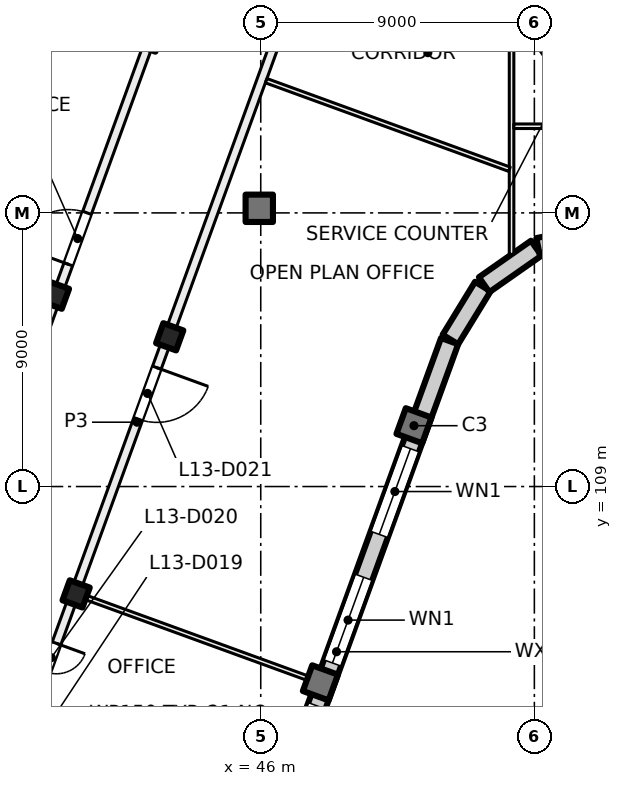
"""IFC4 building model, lengths in metres.
Left out: names, types, materials, properties, quantities, classifications, styles, units other than length and angle.
Written with IfcOpenShell. Run it as: python <this file> out.ifc"""

import sys

from ifc_helpers import new_model, si_unit, direction, frame, frame_2d, origin, origin_2d, place, context, subcontext, project, spatial, rectangle, hollow_rectangle, extrude, element, fill, save


model = new_model("IFC4")
c1 = context("Model", 3, precision=1e-05, world=origin(), true_north=direction((0.0, 1.0)))
c2 = subcontext(c1, "Body", "Model", "MODEL_VIEW")
j1 = project(units=[si_unit("LENGTHUNIT", "METRE"), si_unit("PLANEANGLEUNIT", "RADIAN")], contexts=[c1])
p1 = place(None, origin())
s1 = spatial("IfcSite", under=j1, at=p1, CompositionType="ELEMENT")
p2 = place(p1, origin())
s2 = spatial("IfcBuilding", under=s1, at=p2, CompositionType="ELEMENT")
p3 = place(p2, frame((0.0, 0.0, 59.5)))
s3 = spatial("IfcBuildingStorey", under=s2, at=p3, CompositionType="ELEMENT", Elevation=59.5)
p4 = place(p3, frame((56.036, 123.43, 0.0), z_axis=(0.0, 0.0, 1.0), x_axis=(0.573576436351, -0.819152044289, 0.0)))
e1 = element("IfcColumn", 1, at=p4, inside=s3, PredefinedType="COLUMN", context=c2, shape_type="SweptSolid", body=[
    extrude(hollow_rectangle(XDim=1.4, YDim=1.4, WallThickness=0.04, at=origin_2d()), origin(), (0.0, 0.0, 1.0), 4.0),
])
p5 = place(p3, frame((45.952, 118.152, 0.0), z_axis=(0.0, 0.0, 1.0), x_axis=(1.0, 0.0, 0.0)))
e2 = element("IfcColumn", 2, at=p5, inside=s3, PredefinedType="COLUMN", context=c2, shape_type="SweptSolid", body=[
    extrude(rectangle(XDim=0.9, YDim=0.9, at=origin_2d()), origin(), (0.0, 0.0, 1.0), 4.0),
])
for number, where, z_axis, x_axis in (
    (3, (43.006, 113.925, 0.0), (0.0, 0.0, 1.0), (-0.342, -0.94, 0.0)),
    (4, (39.927, 105.468, 0.0), (0.0, 0.0, 1.0), (-0.342, -0.94, 0.0)),
    (5, (39.247, 115.293, 0.0), (0.0, 0.0, 1.0), (-0.342, -0.94, 0.0)),
):
    element("IfcColumn", number, at=place(p3, frame(where, z_axis=z_axis, x_axis=x_axis)), inside=s3, PredefinedType="COLUMN", context=c2, shape_type="SweptSolid", body=[
        extrude(rectangle(XDim=0.7, YDim=0.7, at=origin_2d()), origin(), (0.0, 0.0, 1.0), 4.0),
    ])
for number, where, z_axis, x_axis in (
    (6, (51.04, 111.001, 0.0), (0.0, 0.0, 1.0), (-0.342, -0.94, 0.0)),
    (7, (47.962, 102.544, 0.0), (0.0, 0.0, 1.0), (-0.342, -0.94, 0.0)),
):
    element("IfcColumn", number, at=place(p3, frame(where, z_axis=z_axis, x_axis=x_axis)), inside=s3, PredefinedType="COLUMN", context=c2, shape_type="SweptSolid", body=[
        extrude(rectangle(XDim=0.9, YDim=0.9, at=origin_2d()), origin(), (0.0, 0.0, 1.0), 4.0),
    ])
p6 = place(p3, frame((52.212, 113.783, 0.0), z_axis=(0.0, 0.0, 1.0), x_axis=(-0.34202521188, -0.939690775968, 0.0)))
e8 = element("IfcWall", 8, at=p6, inside=s3, PredefinedType="SOLIDWALL", context=c2, shape_type="SweptSolid", body=[
    extrude(rectangle(XDim=21.745, YDim=0.6, at=frame_2d((10.873, 0.0))), origin(), (0.0, 0.0, 1.0), 3.625),
])
p7 = place(p6, frame((3.765, 0.0, 0.9)))
e9 = element("IfcOpeningElement", 9, at=p7, cuts=e8, PredefinedType="OPENING", context=c2, shape_type="SweptSolid", body=[
    extrude(rectangle(XDim=3.0, YDim=2.4, at=frame_2d((1.5, 1.2))), frame((0.0, 0.31, 0.0), z_axis=(0.0, -1.0, 0.0), x_axis=(1.0, 0.0, 0.0)), (0.0, 0.0, 1.0), 0.62),
])
p8 = place(p6, frame((8.265, 0.0, 0.9)))
e10 = element("IfcOpeningElement", 10, at=p8, cuts=e8, PredefinedType="OPENING", context=c2, shape_type="SweptSolid", body=[
    extrude(rectangle(XDim=3.0, YDim=2.4, at=frame_2d((1.5, 1.2))), frame((0.0, 0.31, 0.0), z_axis=(0.0, -1.0, 0.0), x_axis=(1.0, 0.0, 0.0)), (0.0, 0.0, 1.0), 0.62),
])
p9 = place(p6, frame((12.765, 0.0, 0.9)))
e11 = element("IfcOpeningElement", 11, at=p9, cuts=e8, PredefinedType="OPENING", context=c2, shape_type="SweptSolid", body=[
    extrude(rectangle(XDim=3.0, YDim=2.4, at=frame_2d((1.5, 1.2))), frame((0.0, 0.31, 0.0), z_axis=(0.0, -1.0, 0.0), x_axis=(1.0, 0.0, 0.0)), (0.0, 0.0, 1.0), 0.62),
])
p10 = place(p6, frame((17.265, 0.0, 0.9)))
e12 = element("IfcOpeningElement", 12, at=p10, cuts=e8, PredefinedType="OPENING", context=c2, shape_type="SweptSolid", body=[
    extrude(rectangle(XDim=3.0, YDim=2.4, at=frame_2d((1.5, 1.2))), frame((0.0, 0.31, 0.0), z_axis=(0.0, -1.0, 0.0), x_axis=(1.0, 0.0, 0.0)), (0.0, 0.0, 1.0), 0.62),
])
p11 = place(p3, frame((53.305, 115.578, 0.0), z_axis=(0.0, 0.0, 1.0), x_axis=(-0.522402266438, -0.852699168535, 0.0)))
e13 = element("IfcWall", 13, at=p11, inside=s3, PredefinedType="SOLIDWALL", context=c2, shape_type="SweptSolid", body=[
    extrude(rectangle(XDim=2.042, YDim=0.6, at=frame_2d((1.021, 0.0))), origin(), (0.0, 0.0, 1.0), 3.625),
])
for number, where, z_axis, x_axis in (
    (14, (55.062, 116.839, 0.0), (0.0, 0.0, 1.0), (-0.819, -0.574, 0.0)),
    (15, (57.175, 117.294, 0.0), (0.0, 0.0, 1.0), (-0.98, -0.199, 0.0)),
):
    element("IfcWall", number, at=place(p3, frame(where, z_axis=z_axis, x_axis=x_axis)), inside=s3, PredefinedType="SOLIDWALL", context=c2, shape_type="SweptSolid", body=[
        extrude(rectangle(XDim=2.092, YDim=0.6, at=frame_2d((1.046, 0.0))), origin(), (0.0, 0.0, 1.0), 3.625),
    ])
p12 = place(p3, frame((32.881, 97.657, 0.0), z_axis=(0.0, 0.0, 1.0), x_axis=(0.342017360004, 0.939693633828, 0.0)))
e16 = element("IfcWall", 16, at=p12, inside=s3, PredefinedType="PARTITIONING", context=c2, shape_type="SweptSolid", body=[
    extrude(rectangle(XDim=34.516, YDim=0.3, at=frame_2d((17.258, 0.0))), origin(), (0.0, 0.0, 1.0), 3.625),
])
p13 = place(p12, frame((6.0, 0.0, 0.0)))
e17 = element("IfcOpeningElement", 17, at=p13, cuts=e16, PredefinedType="OPENING", context=c2, shape_type="SweptSolid", body=[
    extrude(rectangle(XDim=1.0, YDim=2.1, at=frame_2d((0.5, 1.05))), frame((0.0, 0.16, 0.0), z_axis=(0.0, -1.0, 0.0), x_axis=(1.0, 0.0, 0.0)), (0.0, 0.0, 1.0), 0.32),
])
p14 = place(p12, frame((19.85, 0.0, 0.0)))
e18 = element("IfcOpeningElement", 18, at=p14, cuts=e16, PredefinedType="OPENING", context=c2, shape_type="SweptSolid", body=[
    extrude(rectangle(XDim=1.8, YDim=2.1, at=frame_2d((0.9, 1.05))), frame((0.0, 0.16, 0.0), z_axis=(0.0, -1.0, 0.0), x_axis=(1.0, 0.0, 0.0)), (0.0, 0.0, 1.0), 0.32),
])
p15 = place(p3, frame((40.021, 105.434, 0.0), z_axis=(0.0, 0.0, 1.0), x_axis=(0.939687752599, -0.342033518263, 0.0)))
e19 = element("IfcWall", 19, at=p15, inside=s3, PredefinedType="PARTITIONING", context=c2, shape_type="SweptSolid", body=[
    extrude(rectangle(XDim=8.301, YDim=0.15, at=frame_2d((4.15, 0.0))), origin(), (0.0, 0.0, 1.0), 3.625),
])
p16 = place(p3, frame((47.314, 125.909, 0.0), z_axis=(0.0, 0.0, 1.0), x_axis=(-0.342010770371, -0.939696032209, 0.0)))
e20 = element("IfcWall", 20, at=p16, inside=s3, PredefinedType="PARTITIONING", context=c2, shape_type="SweptSolid", body=[
    extrude(rectangle(XDim=31.485, YDim=0.3, at=frame_2d((15.742, 0.0))), origin(), (0.0, 0.0, 1.0), 3.625),
])
p17 = place(p16, frame((28.359, 0.0, 0.0)))
e21 = element("IfcOpeningElement", 21, at=p17, cuts=e20, PredefinedType="OPENING", context=c2, shape_type="SweptSolid", body=[
    extrude(rectangle(XDim=1.0, YDim=2.1, at=frame_2d((0.5, 1.05))), frame((0.0, 0.16, 0.0), z_axis=(0.0, -1.0, 0.0), x_axis=(1.0, 0.0, 0.0)), (0.0, 0.0, 1.0), 0.32),
])
p18 = place(p16, frame((23.484, 0.0, 0.0)))
e22 = element("IfcOpeningElement", 22, at=p18, cuts=e20, PredefinedType="OPENING", context=c2, shape_type="SweptSolid", body=[
    extrude(rectangle(XDim=1.0, YDim=2.1, at=frame_2d((0.5, 1.05))), frame((0.0, 0.16, 0.0), z_axis=(0.0, -1.0, 0.0), x_axis=(1.0, 0.0, 0.0)), (0.0, 0.0, 1.0), 0.32),
])
p19 = place(p16, frame((13.834, 0.0, 0.0)))
e23 = element("IfcOpeningElement", 23, at=p19, cuts=e20, PredefinedType="OPENING", context=c2, shape_type="SweptSolid", body=[
    extrude(rectangle(XDim=1.8, YDim=2.1, at=frame_2d((0.9, 1.05))), frame((0.0, 0.16, 0.0), z_axis=(0.0, -1.0, 0.0), x_axis=(1.0, 0.0, 0.0)), (0.0, 0.0, 1.0), 0.32),
])
p20 = place(p3, frame((54.25, 116.637, 0.0), z_axis=(0.0, 0.0, 1.0), x_axis=(0.0, 1.0, 0.0)))
e24 = element("IfcWall", 24, at=p20, inside=s3, PredefinedType="PARTITIONING", context=c2, shape_type="SweptSolid", body=[
    extrude(rectangle(XDim=9.263, YDim=0.15, at=frame_2d((4.631, 0.0))), origin(), (0.0, 0.0, 1.0), 3.625),
])
p21 = place(p3, frame((54.18, 119.436, 0.0), z_axis=(0.0, 0.0, 1.0), x_axis=(-0.939669476286, 0.342083725624, 0.0)))
e25 = element("IfcWall", 25, at=p21, inside=s3, PredefinedType="PARTITIONING", context=c2, shape_type="SweptSolid", body=[
    extrude(rectangle(XDim=8.516, YDim=0.15, at=frame_2d((4.258, 0.0))), origin(), (0.0, 0.0, 1.0), 3.625),
])
p22 = place(p3, frame((54.325, 120.85, 0.0), z_axis=(0.0, 0.0, 1.0), x_axis=(1.0, 0.0, 0.0)))
e26 = element("IfcWall", 26, at=p22, inside=s3, PredefinedType="PARTITIONING", context=c2, shape_type="SweptSolid", body=[
    extrude(rectangle(XDim=4.35, YDim=0.15, at=frame_2d((2.175, 0.0))), origin(), (0.0, 0.0, 1.0), 3.625),
])
p23 = place(p7, origin())
e27 = element("IfcWindow", 27, at=p23, inside=s3, PartitioningType="SINGLE_PANEL", PredefinedType="WINDOW", context=c2, shape_type="SweptSolid", body=[
    extrude(rectangle(XDim=3.0, YDim=2.4, at=frame_2d((1.5, 1.2))), frame((0.0, 0.03, 0.0), z_axis=(0.0, -1.0, 0.0), x_axis=(1.0, 0.0, 0.0)), (0.0, 0.0, 1.0), 0.06),
])
fill(e9, e27)
p24 = place(p8, origin())
e28 = element("IfcWindow", 28, at=p24, inside=s3, PartitioningType="SINGLE_PANEL", PredefinedType="WINDOW", context=c2, shape_type="SweptSolid", body=[
    extrude(rectangle(XDim=3.0, YDim=2.4, at=frame_2d((1.5, 1.2))), frame((0.0, 0.03, 0.0), z_axis=(0.0, -1.0, 0.0), x_axis=(1.0, 0.0, 0.0)), (0.0, 0.0, 1.0), 0.06),
])
fill(e10, e28)
p25 = place(p9, origin())
e29 = element("IfcWindow", 29, at=p25, inside=s3, PartitioningType="SINGLE_PANEL", PredefinedType="WINDOW", context=c2, shape_type="SweptSolid", body=[
    extrude(rectangle(XDim=3.0, YDim=2.4, at=frame_2d((1.5, 1.2))), frame((0.0, 0.03, 0.0), z_axis=(0.0, -1.0, 0.0), x_axis=(1.0, 0.0, 0.0)), (0.0, 0.0, 1.0), 0.06),
])
fill(e11, e29)
p26 = place(p14, origin())
e30 = element("IfcDoor", 30, at=p26, inside=s3, OperationType="DOUBLE_DOOR_SINGLE_SWING", PredefinedType="DOOR", context=c2, shape_type="SweptSolid", body=[
    extrude(rectangle(XDim=1.8, YDim=2.1, at=frame_2d((0.9, 1.05))), frame((0.0, 0.025, 0.0), z_axis=(0.0, -1.0, 0.0), x_axis=(1.0, 0.0, 0.0)), (0.0, 0.0, 1.0), 0.05),
])
fill(e18, e30)
p27 = place(p18, origin())
e31 = element("IfcDoor", 31, at=p27, inside=s3, OperationType="SINGLE_SWING_LEFT", PredefinedType="DOOR", context=c2, shape_type="SweptSolid", body=[
    extrude(rectangle(XDim=1.0, YDim=2.1, at=frame_2d((0.5, 1.05))), frame((0.0, 0.025, 0.0), z_axis=(0.0, -1.0, 0.0), x_axis=(1.0, 0.0, 0.0)), (0.0, 0.0, 1.0), 0.05),
])
fill(e22, e31)
p28 = place(p19, origin())
e32 = element("IfcDoor", 32, at=p28, inside=s3, OperationType="DOUBLE_DOOR_SINGLE_SWING", PredefinedType="DOOR", context=c2, shape_type="SweptSolid", body=[
    extrude(rectangle(XDim=1.8, YDim=2.1, at=frame_2d((0.9, 1.05))), frame((0.0, 0.025, 0.0), z_axis=(0.0, -1.0, 0.0), x_axis=(1.0, 0.0, 0.0)), (0.0, 0.0, 1.0), 0.05),
])
fill(e23, e32)
save(model, sys.argv[1])
